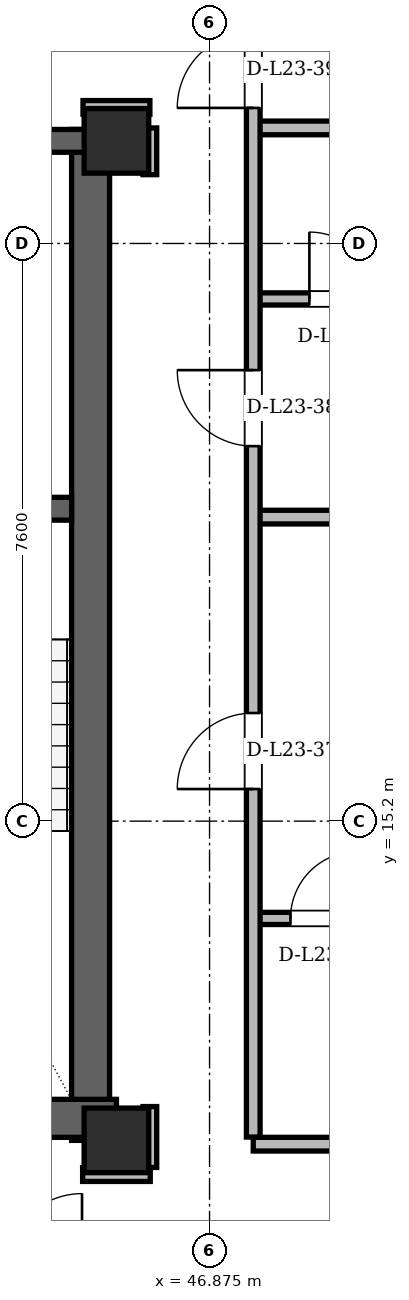
"""IFC4 building model, lengths in metres.
Left out: names, types, materials, properties, quantities, classifications, styles, units other than length and angle.
Written with IfcOpenShell. Run it as: python <this file> out.ifc"""

import sys

from ifc_helpers import new_model, si_unit, direction, frame, frame_2d, origin, origin_2d, place, context, subcontext, project, spatial, rectangle, hollow_rectangle, extrude, element, fill, save


model = new_model("IFC4")
c1 = context("Model", 3, precision=1e-05, world=origin(), true_north=direction((0.0, 1.0)))
c2 = subcontext(c1, "Body", "Model", "MODEL_VIEW")
j1 = project(units=[si_unit("LENGTHUNIT", "METRE"), si_unit("PLANEANGLEUNIT", "RADIAN")], contexts=[c1])
p1 = place(None, origin())
s1 = spatial("IfcSite", under=j1, at=p1, CompositionType="ELEMENT")
p2 = place(p1, origin())
s2 = spatial("IfcBuilding", under=s1, at=p2, CompositionType="ELEMENT")
p3 = place(p2, frame((0.0, 0.0, 89.7)))
s3 = spatial("IfcBuildingStorey", under=s2, at=p3, CompositionType="ELEMENT", Elevation=89.7)
for number, where, z_axis, x_axis in (
    (1, (45.65, 11.0, 0.0), (0.0, 0.0, 1.0), (1.0, 0.0, 0.0)),
    (2, (45.65, 24.15, 0.0), (0.0, 0.0, 1.0), (1.0, 0.0, 0.0)),
):
    element("IfcColumn", number, at=place(p3, frame(where, z_axis=z_axis, x_axis=x_axis)), inside=s3, PredefinedType="COLUMN", context=c2, shape_type="SweptSolid", body=[
        extrude(hollow_rectangle(XDim=0.85, YDim=0.85, WallThickness=0.07, at=origin_2d()), origin(), (0.0, 0.0, 1.0), 3.6),
    ])
p4 = place(p3, frame((45.31, 11.0, 0.0), z_axis=(0.0, 0.0, 1.0), x_axis=(0.0, 1.0, 0.0)))
e3 = element("IfcWall", 3, at=p4, inside=s3, PredefinedType="SHEAR", context=c2, shape_type="SweptSolid", body=[
    extrude(rectangle(XDim=13.3, YDim=0.5, at=frame_2d((6.65, 0.0))), origin(), (0.0, 0.0, 1.0), 3.36),
])
p5 = place(p3, frame((38.55, 11.29, 0.0), z_axis=(0.0, 0.0, 1.0), x_axis=(1.0, 0.0, 0.0)))
e4 = element("IfcWall", 4, at=p5, inside=s3, PredefinedType="SHEAR", context=c2, shape_type="SweptSolid", body=[
    extrude(rectangle(XDim=7.1, YDim=0.5, at=frame_2d((3.55, 0.0))), origin(), (0.0, 0.0, 1.0), 3.36),
])
p6 = place(p3, frame((29.65, 24.15, 0.0), z_axis=(0.0, 0.0, 1.0), x_axis=(1.0, 0.0, 0.0)))
e5 = element("IfcWall", 5, at=p6, inside=s3, PredefinedType="SHEAR", context=c2, shape_type="SweptSolid", body=[
    extrude(rectangle(XDim=15.7, YDim=0.3, at=frame_2d((7.85, 0.0))), origin(), (0.0, 0.0, 1.0), 3.36),
])
p7 = place(p6, frame((1.7, 0.0, 0.0)))
e6 = element("IfcOpeningElement", 6, at=p7, cuts=e5, PredefinedType="OPENING", context=c2, shape_type="SweptSolid", body=[
    extrude(rectangle(XDim=1.2, YDim=2.2, at=frame_2d((0.6, 1.1))), frame((0.0, 0.15, 0.0), z_axis=(0.0, -1.0, 0.0), x_axis=(1.0, 0.0, 0.0)), (0.0, 0.0, 1.0), 0.3),
])
p8 = place(p6, frame((12.8, 0.0, 0.0)))
e7 = element("IfcOpeningElement", 7, at=p8, cuts=e5, PredefinedType="OPENING", context=c2, shape_type="SweptSolid", body=[
    extrude(rectangle(XDim=1.2, YDim=2.2, at=frame_2d((0.6, 1.1))), frame((0.0, 0.15, 0.0), z_axis=(0.0, -1.0, 0.0), x_axis=(1.0, 0.0, 0.0)), (0.0, 0.0, 1.0), 0.3),
])
p9 = place(p6, frame((6.55, 0.0, 0.0)))
e8 = element("IfcOpeningElement", 8, at=p9, cuts=e5, PredefinedType="OPENING", context=c2, shape_type="SweptSolid", body=[
    extrude(rectangle(XDim=0.9, YDim=2.05, at=frame_2d((0.45, 1.025))), frame((0.0, 0.15, 0.0), z_axis=(0.0, -1.0, 0.0), x_axis=(1.0, 0.0, 0.0)), (0.0, 0.0, 1.0), 0.3),
])
p10 = place(p6, frame((8.45, 0.0, 0.0)))
e9 = element("IfcOpeningElement", 9, at=p10, cuts=e5, PredefinedType="OPENING", context=c2, shape_type="SweptSolid", body=[
    extrude(rectangle(XDim=0.9, YDim=2.05, at=frame_2d((0.45, 1.025))), frame((0.0, 0.15, 0.0), z_axis=(0.0, -1.0, 0.0), x_axis=(1.0, 0.0, 0.0)), (0.0, 0.0, 1.0), 0.3),
])
p11 = place(p3, frame((41.05, 19.31, 0.0), z_axis=(0.0, 0.0, 1.0), x_axis=(1.0, 0.0, 0.0)))
e10 = element("IfcWall", 10, at=p11, inside=s3, PredefinedType="SHEAR", context=c2, shape_type="SweptSolid", body=[
    extrude(rectangle(XDim=4.01, YDim=0.3, at=frame_2d((2.005, 0.0))), origin(), (0.0, 0.0, 1.0), 3.36),
])
p12 = place(p11, frame((1.6, 0.0, 0.0)))
e11 = element("IfcOpeningElement", 11, at=p12, cuts=e10, PredefinedType="OPENING", context=c2, shape_type="SweptSolid", body=[
    extrude(rectangle(XDim=1.4, YDim=2.2, at=frame_2d((0.7, 1.1))), frame((0.0, 0.15, 0.0), z_axis=(0.0, -1.0, 0.0), x_axis=(1.0, 0.0, 0.0)), (0.0, 0.0, 1.0), 0.3),
])
p13 = place(p3, frame((60.86, 13.798, 0.0), z_axis=(0.0, 0.0, 1.0), x_axis=(-0.500004029544, 0.866023077313, 0.0)))
e12 = element("IfcWall", 12, at=p13, inside=s3, PredefinedType="SOLIDWALL", context=c2, shape_type="SweptSolid", body=[
    extrude(rectangle(XDim=34.275, YDim=0.34, at=frame_2d((17.137, 0.0))), origin(), (0.0, 0.0, 1.0), 2.578),
])
p14 = place(p13, frame((6.579, 0.0, 0.0)))
e13 = element("IfcOpeningElement", 13, at=p14, cuts=e12, PredefinedType="OPENING", context=c2, shape_type="SweptSolid", body=[
    extrude(rectangle(XDim=1.5, YDim=2.2, at=frame_2d((0.75, 1.1))), frame((0.0, 0.17, 0.0), z_axis=(0.0, -1.0, 0.0), x_axis=(1.0, 0.0, 0.0)), (0.0, 0.0, 1.0), 0.34),
])
p15 = place(p13, frame((24.95, 0.0, 0.0)))
e14 = element("IfcOpeningElement", 14, at=p15, cuts=e12, PredefinedType="OPENING", context=c2, shape_type="SweptSolid", body=[
    extrude(rectangle(XDim=1.5, YDim=2.2, at=frame_2d((0.75, 1.1))), frame((0.0, 0.17, 0.0), z_axis=(0.0, -1.0, 0.0), x_axis=(1.0, 0.0, 0.0)), (0.0, 0.0, 1.0), 0.34),
])
p16 = place(p13, frame((1.607, 0.0, 0.85)))
e15 = element("IfcOpeningElement", 15, at=p16, cuts=e12, PredefinedType="OPENING", context=c2, shape_type="SweptSolid", body=[
    extrude(rectangle(XDim=1.2, YDim=1.48, at=frame_2d((0.6, 0.74))), frame((0.0, 0.17, 0.0), z_axis=(0.0, -1.0, 0.0), x_axis=(1.0, 0.0, 0.0)), (0.0, 0.0, 1.0), 0.34),
])
p17 = place(p13, frame((30.62, 0.0, 0.85)))
e16 = element("IfcOpeningElement", 16, at=p17, cuts=e12, PredefinedType="OPENING", context=c2, shape_type="SweptSolid", body=[
    extrude(rectangle(XDim=2.5, YDim=1.618, at=frame_2d((1.25, 0.809))), frame((0.0, 0.17, 0.0), z_axis=(0.0, -1.0, 0.0), x_axis=(1.0, 0.0, 0.0)), (0.0, 0.0, 1.0), 0.34),
])
p18 = place(p13, frame((20.128, 0.0, 0.85)))
e17 = element("IfcOpeningElement", 17, at=p18, cuts=e12, PredefinedType="OPENING", context=c2, shape_type="SweptSolid", body=[
    extrude(rectangle(XDim=2.4, YDim=1.618, at=frame_2d((1.2, 0.809))), frame((0.0, 0.17, 0.0), z_axis=(0.0, -1.0, 0.0), x_axis=(1.0, 0.0, 0.0)), (0.0, 0.0, 1.0), 0.34),
])
p19 = place(p13, frame((26.756, 0.0, 0.85)))
e18 = element("IfcOpeningElement", 18, at=p19, cuts=e12, PredefinedType="OPENING", context=c2, shape_type="SweptSolid", body=[
    extrude(rectangle(XDim=1.2, YDim=1.48, at=frame_2d((0.6, 0.74))), frame((0.0, 0.17, 0.0), z_axis=(0.0, -1.0, 0.0), x_axis=(1.0, 0.0, 0.0)), (0.0, 0.0, 1.0), 0.34),
])
p20 = place(p13, frame((15.335, 0.0, 0.85)))
e19 = element("IfcOpeningElement", 19, at=p20, cuts=e12, PredefinedType="OPENING", context=c2, shape_type="SweptSolid", body=[
    extrude(rectangle(XDim=1.2, YDim=1.48, at=frame_2d((0.6, 0.74))), frame((0.0, 0.17, 0.0), z_axis=(0.0, -1.0, 0.0), x_axis=(1.0, 0.0, 0.0)), (0.0, 0.0, 1.0), 0.34),
])
p21 = place(p13, frame((17.911, 0.0, 0.85)))
e20 = element("IfcOpeningElement", 20, at=p21, cuts=e12, PredefinedType="OPENING", context=c2, shape_type="SweptSolid", body=[
    extrude(rectangle(XDim=1.2, YDim=1.48, at=frame_2d((0.6, 0.74))), frame((0.0, 0.17, 0.0), z_axis=(0.0, -1.0, 0.0), x_axis=(1.0, 0.0, 0.0)), (0.0, 0.0, 1.0), 0.34),
])
p22 = place(p3, frame((45.205, 10.55, 0.0), z_axis=(0.0, 0.0, 1.0), x_axis=(1.0, 0.0, 0.0)))
e21 = element("IfcWall", 21, at=p22, inside=s3, PredefinedType="PARTITIONING", context=c2, shape_type="SweptSolid", body=[
    extrude(rectangle(XDim=0.89, YDim=0.18, at=frame_2d((0.445, 0.0))), origin(), (0.0, 0.0, 1.0), 3.36),
])
p23 = place(p3, frame((47.45, 10.95, 0.0), z_axis=(0.0, 0.0, 1.0), x_axis=(1.0, 0.0, 0.0)))
e22 = element("IfcWall", 22, at=p23, inside=s3, PredefinedType="PARTITIONING", context=c2, shape_type="SweptSolid", body=[
    extrude(rectangle(XDim=11.564, YDim=0.18, at=frame_2d((5.782, 0.0))), origin(), (0.0, 0.0, 1.0), 3.36),
])
p24 = place(p3, frame((47.4, 13.92, 0.0), z_axis=(0.0, 0.0, 1.0), x_axis=(1.0, 0.0, 0.0)))
e23 = element("IfcWall", 23, at=p24, inside=s3, PredefinedType="PARTITIONING", context=c2, shape_type="SweptSolid", body=[
    extrude(rectangle(XDim=13.066, YDim=0.16, at=frame_2d((6.533, 0.0))), origin(), (0.0, 0.0, 1.0), 3.36),
])
p25 = place(p24, frame((0.54, 0.0, 0.0)))
e24 = element("IfcOpeningElement", 24, at=p25, cuts=e23, PredefinedType="OPENING", context=c2, shape_type="SweptSolid", body=[
    extrude(rectangle(XDim=0.88, YDim=2.08, at=frame_2d((0.44, 1.04))), frame((0.0, 0.08, 0.0), z_axis=(0.0, -1.0, 0.0), x_axis=(1.0, 0.0, 0.0)), (0.0, 0.0, 1.0), 0.16),
])
p26 = place(p24, frame((2.957, 0.0, 0.0)))
e25 = element("IfcOpeningElement", 25, at=p26, cuts=e23, PredefinedType="OPENING", context=c2, shape_type="SweptSolid", body=[
    extrude(rectangle(XDim=0.95, YDim=2.1, at=frame_2d((0.475, 1.05))), frame((0.0, 0.08, 0.0), z_axis=(0.0, -1.0, 0.0), x_axis=(1.0, 0.0, 0.0)), (0.0, 0.0, 1.0), 0.16),
])
p27 = place(p24, frame((5.573, 0.0, 0.0)))
e26 = element("IfcOpeningElement", 26, at=p27, cuts=e23, PredefinedType="OPENING", context=c2, shape_type="SweptSolid", body=[
    extrude(rectangle(XDim=0.95, YDim=2.1, at=frame_2d((0.475, 1.05))), frame((0.0, 0.08, 0.0), z_axis=(0.0, -1.0, 0.0), x_axis=(1.0, 0.0, 0.0)), (0.0, 0.0, 1.0), 0.16),
])
p28 = place(p24, frame((8.167, 0.0, 0.0)))
e27 = element("IfcOpeningElement", 27, at=p28, cuts=e23, PredefinedType="OPENING", context=c2, shape_type="SweptSolid", body=[
    extrude(rectangle(XDim=0.92, YDim=2.12, at=frame_2d((0.46, 1.06))), frame((0.0, 0.08, 0.0), z_axis=(0.0, -1.0, 0.0), x_axis=(1.0, 0.0, 0.0)), (0.0, 0.0, 1.0), 0.16),
])
p29 = place(p24, frame((11.19, 0.0, 0.0)))
e28 = element("IfcOpeningElement", 28, at=p29, cuts=e23, PredefinedType="OPENING", context=c2, shape_type="SweptSolid", body=[
    extrude(rectangle(XDim=0.95, YDim=2.1, at=frame_2d((0.475, 1.05))), frame((0.0, 0.08, 0.0), z_axis=(0.0, -1.0, 0.0), x_axis=(1.0, 0.0, 0.0)), (0.0, 0.0, 1.0), 0.16),
])
p30 = place(p3, frame((47.45, 19.2, 0.0), z_axis=(0.0, 0.0, 1.0), x_axis=(1.0, 0.0, 0.0)))
e29 = element("IfcWall", 29, at=p30, inside=s3, PredefinedType="PARTITIONING", context=c2, shape_type="SweptSolid", body=[
    extrude(rectangle(XDim=10.09, YDim=0.18, at=frame_2d((5.045, 0.0))), origin(), (0.0, 0.0, 1.0), 3.36),
])
p31 = place(p3, frame((47.4, 22.07, 0.0), z_axis=(0.0, 0.0, 1.0), x_axis=(1.0, 0.0, 0.0)))
e30 = element("IfcWall", 30, at=p31, inside=s3, PredefinedType="PARTITIONING", context=c2, shape_type="SweptSolid", body=[
    extrude(rectangle(XDim=8.483, YDim=0.16, at=frame_2d((4.242, 0.0))), origin(), (0.0, 0.0, 1.0), 3.36),
])
p32 = place(p31, frame((0.789, 0.0, 0.0)))
e31 = element("IfcOpeningElement", 31, at=p32, cuts=e30, PredefinedType="OPENING", context=c2, shape_type="SweptSolid", body=[
    extrude(rectangle(XDim=0.88, YDim=2.08, at=frame_2d((0.44, 1.04))), frame((0.0, 0.08, 0.0), z_axis=(0.0, -1.0, 0.0), x_axis=(1.0, 0.0, 0.0)), (0.0, 0.0, 1.0), 0.16),
])
p33 = place(p31, frame((3.487, 0.0, 0.0)))
e32 = element("IfcOpeningElement", 32, at=p33, cuts=e30, PredefinedType="OPENING", context=c2, shape_type="SweptSolid", body=[
    extrude(rectangle(XDim=0.95, YDim=2.1, at=frame_2d((0.475, 1.05))), frame((0.0, 0.08, 0.0), z_axis=(0.0, -1.0, 0.0), x_axis=(1.0, 0.0, 0.0)), (0.0, 0.0, 1.0), 0.16),
])
p34 = place(p31, frame((6.086, 0.0, 0.0)))
e33 = element("IfcOpeningElement", 33, at=p34, cuts=e30, PredefinedType="OPENING", context=c2, shape_type="SweptSolid", body=[
    extrude(rectangle(XDim=0.95, YDim=2.1, at=frame_2d((0.475, 1.05))), frame((0.0, 0.08, 0.0), z_axis=(0.0, -1.0, 0.0), x_axis=(1.0, 0.0, 0.0)), (0.0, 0.0, 1.0), 0.16),
])
p35 = place(p3, frame((47.45, 24.32, 0.0), z_axis=(0.0, 0.0, 1.0), x_axis=(1.0, 0.0, 0.0)))
e34 = element("IfcWall", 34, at=p35, inside=s3, PredefinedType="PARTITIONING", context=c2, shape_type="SweptSolid", body=[
    extrude(rectangle(XDim=7.134, YDim=0.18, at=frame_2d((3.567, 0.0))), origin(), (0.0, 0.0, 1.0), 3.36),
])
p36 = place(p3, frame((45.21, 24.59, 0.0), z_axis=(0.0, 0.0, 1.0), x_axis=(1.0, 0.0, 0.0)))
e35 = element("IfcWall", 35, at=p36, inside=s3, PredefinedType="PARTITIONING", context=c2, shape_type="SweptSolid", body=[
    extrude(rectangle(XDim=0.88, YDim=0.18, at=frame_2d((0.44, 0.0))), origin(), (0.0, 0.0, 1.0), 2.814),
])
p37 = place(p3, frame((46.09, 10.644, 0.0), z_axis=(0.0, 0.0, 1.0), x_axis=(0.0, 1.0, 0.0)))
e36 = element("IfcWall", 36, at=p37, inside=s3, PredefinedType="PARTITIONING", context=c2, shape_type="SweptSolid", body=[
    extrude(rectangle(XDim=0.801, YDim=0.18, at=frame_2d((0.4, 0.0))), origin(), (0.0, 0.0, 1.0), 2.814),
])
p38 = place(p3, frame((46.09, 23.705, 0.0), z_axis=(0.0, 0.0, 1.0), x_axis=(0.0, 1.0, 0.0)))
e37 = element("IfcWall", 37, at=p38, inside=s3, PredefinedType="PARTITIONING", context=c2, shape_type="SweptSolid", body=[
    extrude(rectangle(XDim=0.615, YDim=0.18, at=frame_2d((0.308, 0.0))), origin(), (0.0, 0.0, 1.0), 2.946),
])
p39 = place(p3, frame((47.45, 11.044, 0.0), z_axis=(0.0, 0.0, 1.0), x_axis=(0.0, 1.0, 0.0)))
e38 = element("IfcWall", 38, at=p39, inside=s3, PredefinedType="PARTITIONING", context=c2, shape_type="SweptSolid", body=[
    extrude(rectangle(XDim=14.832, YDim=0.18, at=frame_2d((7.416, 0.0))), origin(), (0.0, 0.0, 1.0), 2.814),
])
p40 = place(p39, frame((4.578, 0.0, 0.0)))
e39 = element("IfcOpeningElement", 39, at=p40, cuts=e38, PredefinedType="OPENING", context=c2, shape_type="SweptSolid", body=[
    extrude(rectangle(XDim=1.0, YDim=2.18, at=frame_2d((0.5, 1.09))), frame((0.0, 0.09, 0.0), z_axis=(0.0, -1.0, 0.0), x_axis=(1.0, 0.0, 0.0)), (0.0, 0.0, 1.0), 0.18),
])
p41 = place(p39, frame((9.09, 0.0, 0.0)))
e40 = element("IfcOpeningElement", 40, at=p41, cuts=e38, PredefinedType="OPENING", context=c2, shape_type="SweptSolid", body=[
    extrude(rectangle(XDim=1.0, YDim=2.18, at=frame_2d((0.5, 1.09))), frame((0.0, 0.09, 0.0), z_axis=(0.0, -1.0, 0.0), x_axis=(1.0, 0.0, 0.0)), (0.0, 0.0, 1.0), 0.18),
])
p42 = place(p39, frame((13.539, 0.0, 0.0)))
e41 = element("IfcOpeningElement", 41, at=p42, cuts=e38, PredefinedType="OPENING", context=c2, shape_type="SweptSolid", body=[
    extrude(rectangle(XDim=1.0, YDim=2.18, at=frame_2d((0.5, 1.09))), frame((0.0, 0.09, 0.0), z_axis=(0.0, -1.0, 0.0), x_axis=(1.0, 0.0, 0.0)), (0.0, 0.0, 1.0), 0.18),
])
p43 = place(p25, origin())
e42 = element("IfcDoor", 42, at=p43, inside=s3, OperationType="SINGLE_SWING_RIGHT", PredefinedType="DOOR", context=c2, shape_type="SweptSolid", body=[
    extrude(rectangle(XDim=0.88, YDim=2.08, at=frame_2d((0.44, 1.04))), frame((0.0, 0.025, 0.0), z_axis=(0.0, -1.0, 0.0), x_axis=(1.0, 0.0, 0.0)), (0.0, 0.0, 1.0), 0.05),
])
fill(e24, e42)
p44 = place(p32, origin())
e43 = element("IfcDoor", 43, at=p44, inside=s3, OperationType="SINGLE_SWING_LEFT", PredefinedType="DOOR", context=c2, shape_type="SweptSolid", body=[
    extrude(rectangle(XDim=0.88, YDim=2.08, at=frame_2d((0.44, 1.04))), frame((0.0, 0.025, 0.0), z_axis=(0.0, -1.0, 0.0), x_axis=(1.0, 0.0, 0.0)), (0.0, 0.0, 1.0), 0.05),
])
fill(e31, e43)
p45 = place(p40, origin())
e44 = element("IfcDoor", 44, at=p45, inside=s3, OperationType="SINGLE_SWING_LEFT", PredefinedType="DOOR", context=c2, shape_type="SweptSolid", body=[
    extrude(rectangle(XDim=1.0, YDim=2.18, at=frame_2d((0.5, 1.09))), frame((0.0, 0.025, 0.0), z_axis=(0.0, -1.0, 0.0), x_axis=(1.0, 0.0, 0.0)), (0.0, 0.0, 1.0), 0.05),
])
fill(e39, e44)
p46 = place(p41, origin())
e45 = element("IfcDoor", 45, at=p46, inside=s3, OperationType="SINGLE_SWING_RIGHT", PredefinedType="DOOR", context=c2, shape_type="SweptSolid", body=[
    extrude(rectangle(XDim=1.0, YDim=2.18, at=frame_2d((0.5, 1.09))), frame((0.0, 0.025, 0.0), z_axis=(0.0, -1.0, 0.0), x_axis=(1.0, 0.0, 0.0)), (0.0, 0.0, 1.0), 0.05),
])
fill(e40, e45)
p47 = place(p42, origin())
e46 = element("IfcDoor", 46, at=p47, inside=s3, OperationType="SINGLE_SWING_LEFT", PredefinedType="DOOR", context=c2, shape_type="SweptSolid", body=[
    extrude(rectangle(XDim=1.0, YDim=2.18, at=frame_2d((0.5, 1.09))), frame((0.0, 0.025, 0.0), z_axis=(0.0, -1.0, 0.0), x_axis=(1.0, 0.0, 0.0)), (0.0, 0.0, 1.0), 0.05),
])
fill(e41, e46)
save(model, sys.argv[1])
